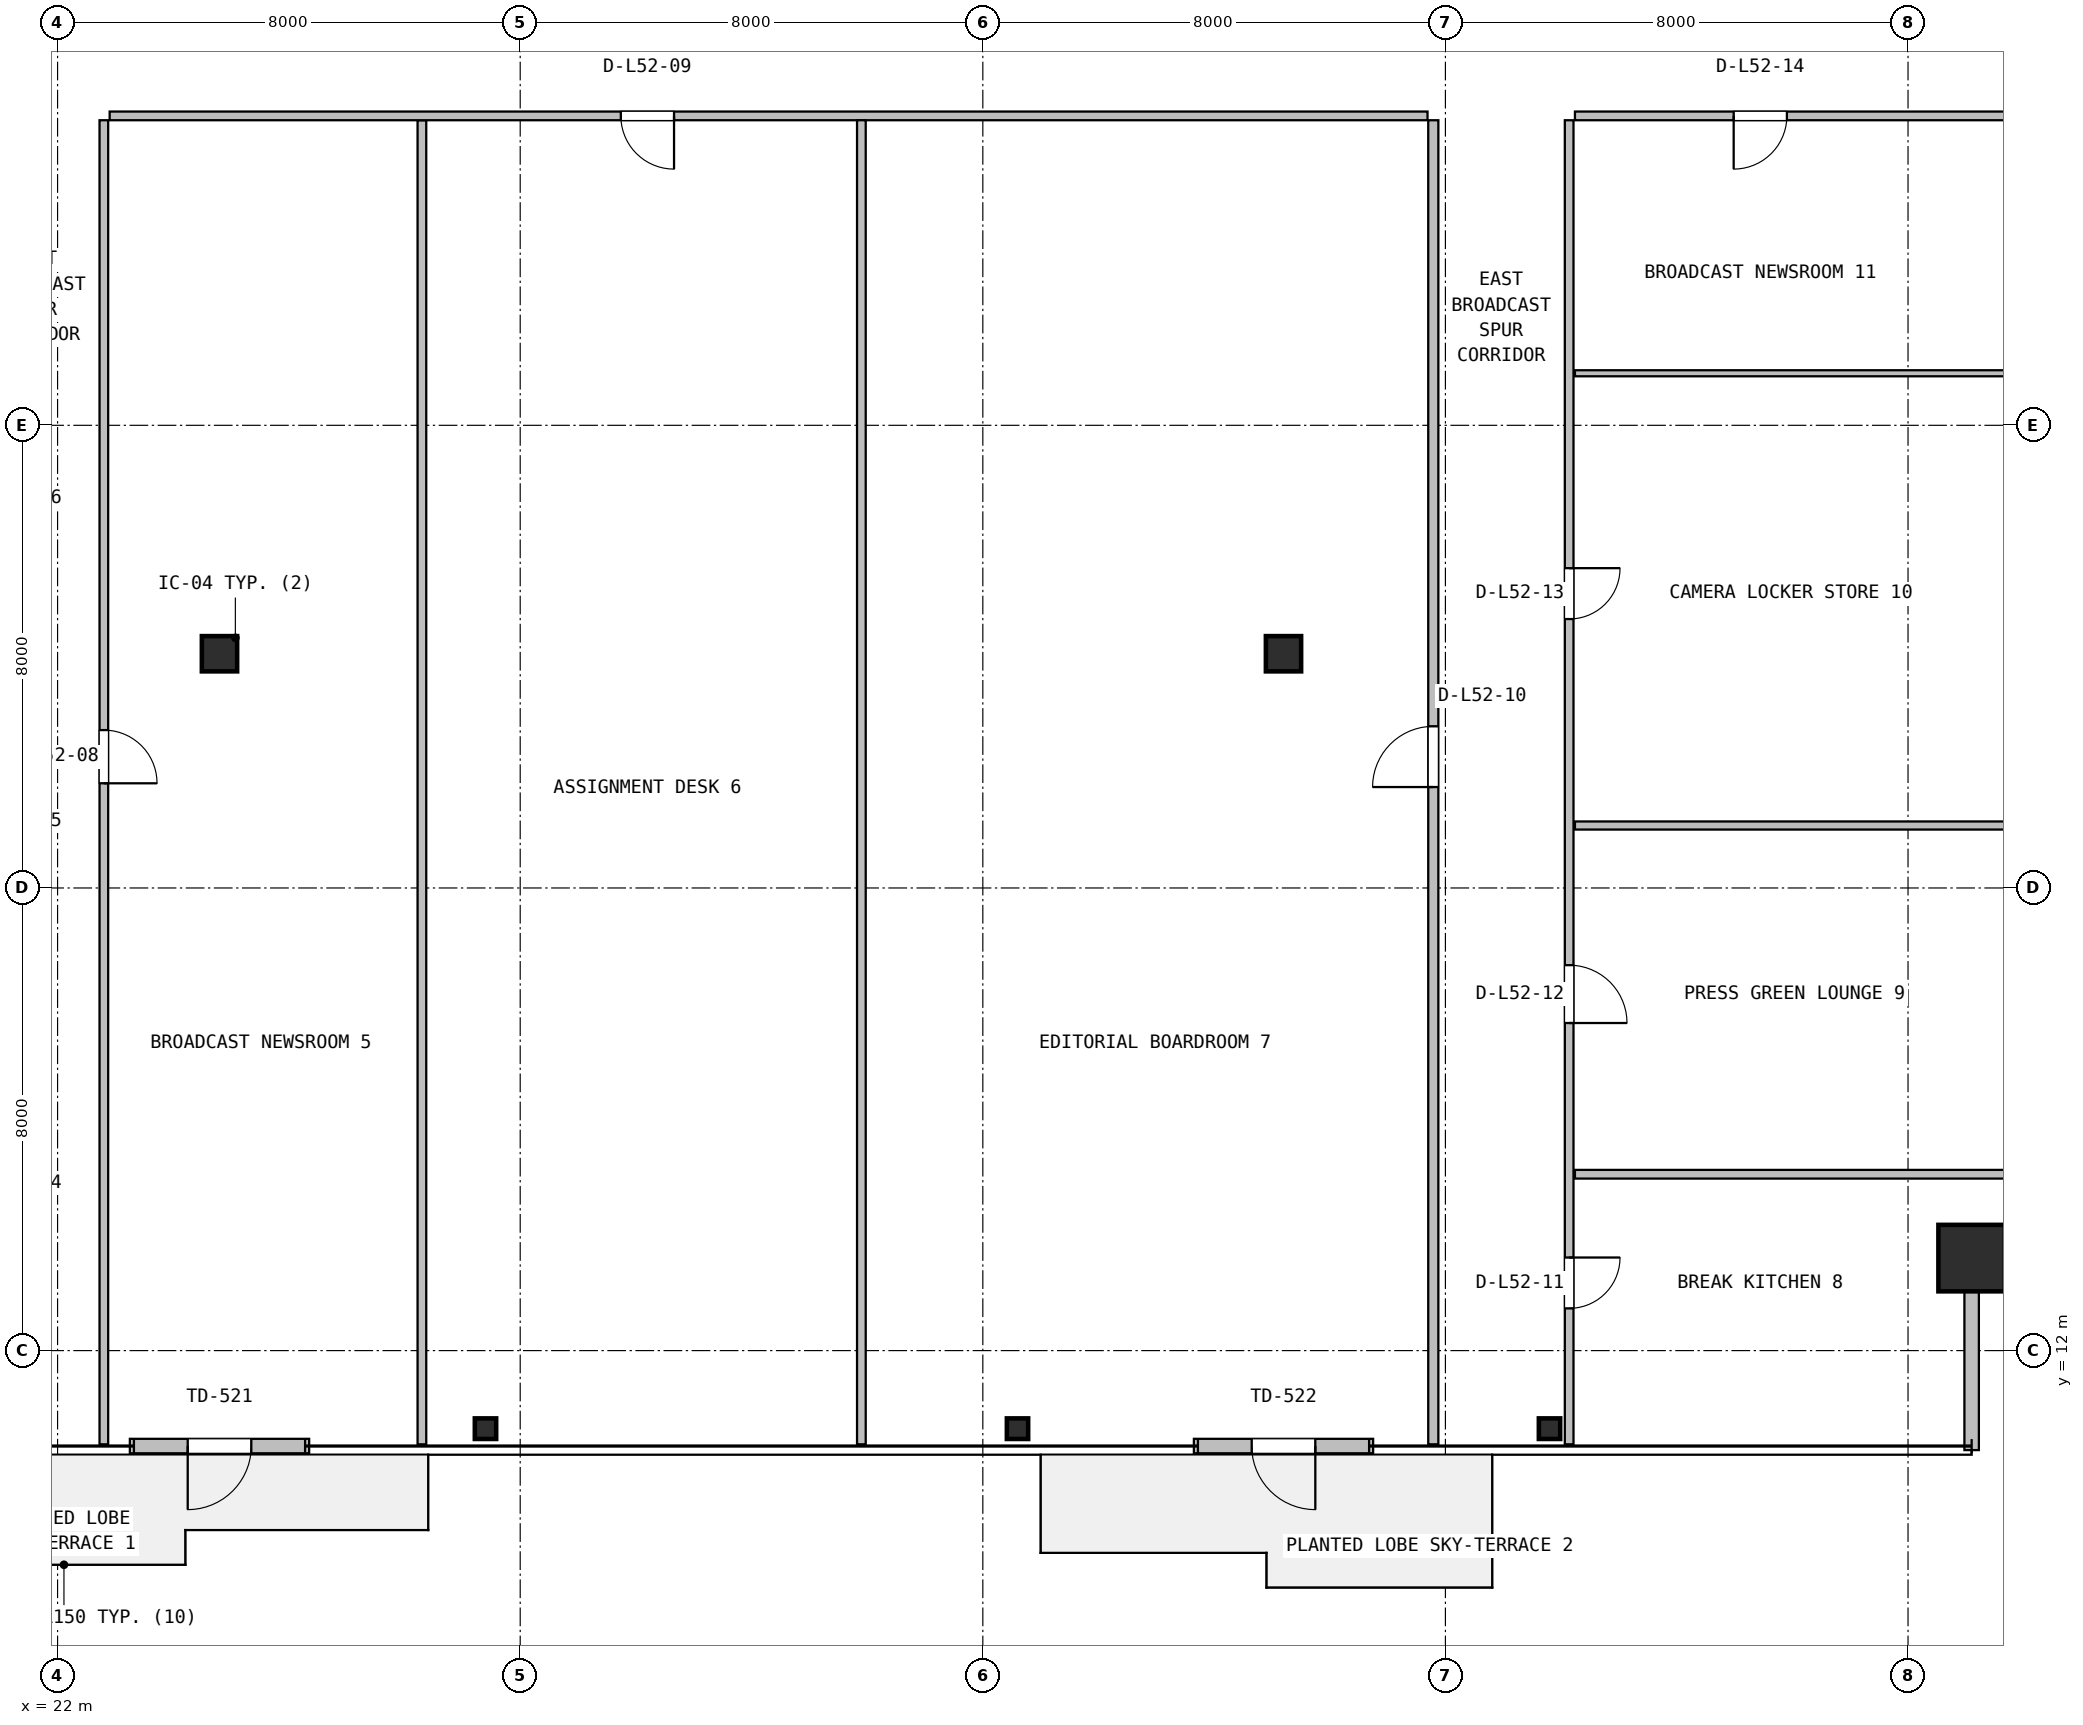
"""IFC4 building model, lengths in metres.
Left out: names, types, materials, properties, quantities, classifications, styles, units other than length and angle.
Written with IfcOpenShell. Run it as: python <this file> out.ifc"""

import sys

from ifc_helpers import new_model, si_unit, direction, frame, frame_2d, origin, origin_2d, place, context, subcontext, project, spatial, rectangle, hollow_rectangle, hollow_circle, i_section, extrude, source, transform, mapped, element, fill, save


model = new_model("IFC4")
c1 = context("Model", 3, precision=1e-05, world=origin(), true_north=direction((0.0, 1.0)))
c2 = subcontext(c1, "Body", "Model", "MODEL_VIEW")
j1 = project(units=[si_unit("LENGTHUNIT", "METRE"), si_unit("PLANEANGLEUNIT", "RADIAN")], contexts=[c1])
p1 = place(None, origin())
s1 = spatial("IfcSite", under=j1, at=p1, CompositionType="ELEMENT")
p2 = place(p1, origin())
s2 = spatial("IfcBuilding", under=s1, at=p2, CompositionType="ELEMENT")
p3 = place(p2, frame((0.0, 0.0, 211.2)))
s3 = spatial("IfcBuildingStorey", under=s2, at=p3, CompositionType="ELEMENT", Elevation=211.2)
m1 = source(origin(), c2, "Body", "SweptSolid", [
    extrude(hollow_rectangle(XDim=1.15, YDim=1.15, WallThickness=0.045, at=origin_2d()), origin(), (0.0, 0.0, 1.0), 3.8),
])
p4 = place(p3, frame((55.1, 13.6, 0.0), z_axis=(0.0, 0.0, 1.0), x_axis=(1.0, 0.0, 0.0)))
e1 = element("IfcColumn", 1, at=p4, inside=s3, PredefinedType="COLUMN", context=c2, shape_type="MappedRepresentation", body=[
    mapped(m1, transform((0.0, 0.0, 0.0), x_axis=(1.0, 0.0, 0.0), y_axis=(0.0, 1.0, 0.0), z_axis=(0.0, 0.0, 1.0), scale=1.0)),
])
m2 = source(origin(), c2, "Body", "SweptSolid", [
    extrude(i_section(OverallWidth=0.369, OverallDepth=0.356, WebThickness=0.011, FlangeThickness=0.018, FilletRadius=0.016, at=origin_2d()), origin(), (0.0, 0.0, 1.0), 3.8),
])
for number, where, z_axis, x_axis in (
    (2, (29.4, 10.65, 0.0), (0.0, 0.0, 1.0), (1.0, 0.0, 0.0)),
    (3, (38.6, 10.65, 0.0), (0.0, 0.0, 1.0), (1.0, 0.0, 0.0)),
    (4, (47.8, 10.65, 0.0), (0.0, 0.0, 1.0), (1.0, 0.0, 0.0)),
):
    element("IfcColumn", number, at=place(p3, frame(where, z_axis=z_axis, x_axis=x_axis)), inside=s3, PredefinedType="COLUMN", context=c2, shape_type="MappedRepresentation", body=[
        mapped(m2, transform((0.0, 0.0, 0.0), x_axis=(1.0, 0.0, 0.0), y_axis=(0.0, 1.0, 0.0), z_axis=(0.0, 0.0, 1.0), scale=1.0)),
    ])
m3 = source(origin(), c2, "Body", "SweptSolid", [
    extrude(hollow_circle(Radius=0.305, WallThickness=0.025, at=origin_2d()), origin(), (0.0, 0.0, 1.0), 3.8),
])
for number, where, z_axis, x_axis in (
    (5, (24.8, 24.05, 0.0), (0.0, 0.0, 1.0), (1.0, 0.0, 0.0)),
    (6, (43.2, 24.05, 0.0), (0.0, 0.0, 1.0), (1.0, 0.0, 0.0)),
):
    element("IfcColumn", number, at=place(p3, frame(where, z_axis=z_axis, x_axis=x_axis)), inside=s3, PredefinedType="COLUMN", context=c2, shape_type="MappedRepresentation", body=[
        mapped(m3, transform((0.0, 0.0, 0.0), x_axis=(1.0, 0.0, 0.0), y_axis=(0.0, 1.0, 0.0), z_axis=(0.0, 0.0, 1.0), scale=1.0)),
    ])
p5 = place(p3, frame((23.25, 10.35, 0.0), z_axis=(0.0, 0.0, 1.0), x_axis=(1.0, 0.0, 0.0)))
e7 = element("IfcWall", 7, at=p5, inside=s3, PredefinedType="SOLIDWALL", context=c2, shape_type="SweptSolid", body=[
    extrude(rectangle(XDim=3.1, YDim=0.25, at=frame_2d((1.55, 0.0))), origin(), (0.0, 0.0, 1.0), 3.53),
])
p6 = place(p5, frame((1.0, 0.0, 0.0)))
e8 = element("IfcOpeningElement", 8, at=p6, cuts=e7, PredefinedType="OPENING", context=c2, shape_type="SweptSolid", body=[
    extrude(rectangle(XDim=1.1, YDim=2.15, at=frame_2d((0.55, 1.075))), frame((0.0, 0.135, 0.0), z_axis=(0.0, -1.0, 0.0), x_axis=(1.0, 0.0, 0.0)), (0.0, 0.0, 1.0), 0.27),
])
p7 = place(p3, frame((41.65, 10.35, 0.0), z_axis=(0.0, 0.0, 1.0), x_axis=(1.0, 0.0, 0.0)))
e9 = element("IfcWall", 9, at=p7, inside=s3, PredefinedType="SOLIDWALL", context=c2, shape_type="SweptSolid", body=[
    extrude(rectangle(XDim=3.1, YDim=0.25, at=frame_2d((1.55, 0.0))), origin(), (0.0, 0.0, 1.0), 3.53),
])
p8 = place(p7, frame((1.0, 0.0, 0.0)))
e10 = element("IfcOpeningElement", 10, at=p8, cuts=e9, PredefinedType="OPENING", context=c2, shape_type="SweptSolid", body=[
    extrude(rectangle(XDim=1.1, YDim=2.15, at=frame_2d((0.55, 1.075))), frame((0.0, 0.135, 0.0), z_axis=(0.0, -1.0, 0.0), x_axis=(1.0, 0.0, 0.0)), (0.0, 0.0, 1.0), 0.27),
])
p9 = place(p3, frame((55.1, 10.28, 0.0), z_axis=(0.0, 0.0, 1.0), x_axis=(0.0, 1.0, 0.0)))
e11 = element("IfcWall", 11, at=p9, inside=s3, PredefinedType="SOLIDWALL", context=c2, shape_type="SweptSolid", body=[
    extrude(rectangle(XDim=3.4, YDim=0.25, at=frame_2d((1.7, 0.0))), origin(), (0.0, 0.0, 1.0), 3.171),
])
p10 = place(p3, frame((28.3, 10.38, 0.0), z_axis=(0.0, 0.0, 1.0), x_axis=(0.0, 1.0, 0.0)))
e12 = element("IfcWall", 12, at=p10, inside=s3, PredefinedType="PARTITIONING", context=c2, shape_type="SweptSolid", body=[
    extrude(rectangle(XDim=22.895, YDim=0.15, at=frame_2d((11.448, 0.0))), origin(), (0.0, 0.0, 1.0), 2.908),
])
p11 = place(p3, frame((22.9, 33.35, 0.0), z_axis=(0.0, 0.0, 1.0), x_axis=(1.0, 0.0, 0.0)))
e13 = element("IfcWall", 13, at=p11, inside=s3, PredefinedType="PARTITIONING", context=c2, shape_type="SweptSolid", body=[
    extrude(rectangle(XDim=22.79, YDim=0.15, at=frame_2d((11.395, 0.0))), origin(), (0.0, 0.0, 1.0), 2.908),
])
p12 = place(p11, frame((8.84, 0.0, 0.0)))
e14 = element("IfcOpeningElement", 14, at=p12, cuts=e13, PredefinedType="OPENING", context=c2, shape_type="SweptSolid", body=[
    extrude(rectangle(XDim=0.92, YDim=2.08, at=frame_2d((0.46, 1.04))), frame((0.0, 0.085, 0.0), z_axis=(0.0, -1.0, 0.0), x_axis=(1.0, 0.0, 0.0)), (0.0, 0.0, 1.0), 0.17),
])
p13 = place(p3, frame((22.8, 10.38, 0.0), z_axis=(0.0, 0.0, 1.0), x_axis=(0.0, 1.0, 0.0)))
e15 = element("IfcWall", 15, at=p13, inside=s3, PredefinedType="PARTITIONING", context=c2, shape_type="SweptSolid", body=[
    extrude(rectangle(XDim=22.895, YDim=0.15, at=frame_2d((11.448, 0.0))), origin(), (0.0, 0.0, 1.0), 3.171),
])
p14 = place(p13, frame((11.43, 0.0, 0.0)))
e16 = element("IfcOpeningElement", 16, at=p14, cuts=e15, PredefinedType="OPENING", context=c2, shape_type="SweptSolid", body=[
    extrude(rectangle(XDim=0.92, YDim=2.08, at=frame_2d((0.46, 1.04))), frame((0.0, 0.085, 0.0), z_axis=(0.0, -1.0, 0.0), x_axis=(1.0, 0.0, 0.0)), (0.0, 0.0, 1.0), 0.17),
])
p15 = place(p3, frame((35.9, 10.38, 0.0), z_axis=(0.0, 0.0, 1.0), x_axis=(0.0, 1.0, 0.0)))
e17 = element("IfcWall", 17, at=p15, inside=s3, PredefinedType="PARTITIONING", context=c2, shape_type="SweptSolid", body=[
    extrude(rectangle(XDim=22.895, YDim=0.15, at=frame_2d((11.448, 0.0))), origin(), (0.0, 0.0, 1.0), 2.908),
])
p16 = place(p3, frame((45.79, 10.38, 0.0), z_axis=(0.0, 0.0, 1.0), x_axis=(0.0, 1.0, 0.0)))
e18 = element("IfcWall", 18, at=p16, inside=s3, PredefinedType="PARTITIONING", context=c2, shape_type="SweptSolid", body=[
    extrude(rectangle(XDim=22.895, YDim=0.175, at=frame_2d((11.448, 0.0))), origin(), (0.0, 0.0, 1.0), 2.908),
])
p17 = place(p16, frame((11.365, 0.0, 0.0)))
e19 = element("IfcOpeningElement", 19, at=p17, cuts=e18, PredefinedType="OPENING", context=c2, shape_type="SweptSolid", body=[
    extrude(rectangle(XDim=1.05, YDim=2.1, at=frame_2d((0.525, 1.05))), frame((0.0, 0.098, 0.0), z_axis=(0.0, -1.0, 0.0), x_axis=(1.0, 0.0, 0.0)), (0.0, 0.0, 1.0), 0.195),
])
p18 = place(p3, frame((48.24, 15.05, 0.0), z_axis=(0.0, 0.0, 1.0), x_axis=(1.0, 0.0, 0.0)))
e20 = element("IfcWall", 20, at=p18, inside=s3, PredefinedType="PARTITIONING", context=c2, shape_type="SweptSolid", body=[
    extrude(rectangle(XDim=10.08, YDim=0.15, at=frame_2d((5.04, 0.0))), origin(), (0.0, 0.0, 1.0), 3.171),
])
p19 = place(p3, frame((48.14, 10.38, 0.0), z_axis=(0.0, 0.0, 1.0), x_axis=(0.0, 1.0, 0.0)))
e21 = element("IfcWall", 21, at=p19, inside=s3, PredefinedType="PARTITIONING", context=c2, shape_type="SweptSolid", body=[
    extrude(rectangle(XDim=22.895, YDim=0.15, at=frame_2d((11.448, 0.0))), origin(), (0.0, 0.0, 1.0), 3.171),
])
p20 = place(p19, frame((2.35, 0.0, 0.0)))
e22 = element("IfcOpeningElement", 22, at=p20, cuts=e21, PredefinedType="OPENING", context=c2, shape_type="SweptSolid", body=[
    extrude(rectangle(XDim=0.88, YDim=2.06, at=frame_2d((0.44, 1.03))), frame((0.0, 0.085, 0.0), z_axis=(0.0, -1.0, 0.0), x_axis=(1.0, 0.0, 0.0)), (0.0, 0.0, 1.0), 0.17),
])
p21 = place(p19, frame((7.285, 0.0, 0.0)))
e23 = element("IfcOpeningElement", 23, at=p21, cuts=e21, PredefinedType="OPENING", context=c2, shape_type="SweptSolid", body=[
    extrude(rectangle(XDim=1.0, YDim=2.1, at=frame_2d((0.5, 1.05))), frame((0.0, 0.085, 0.0), z_axis=(0.0, -1.0, 0.0), x_axis=(1.0, 0.0, 0.0)), (0.0, 0.0, 1.0), 0.17),
])
p22 = place(p19, frame((14.27, 0.0, 0.0)))
e24 = element("IfcOpeningElement", 24, at=p22, cuts=e21, PredefinedType="OPENING", context=c2, shape_type="SweptSolid", body=[
    extrude(rectangle(XDim=0.88, YDim=2.06, at=frame_2d((0.44, 1.03))), frame((0.0, 0.085, 0.0), z_axis=(0.0, -1.0, 0.0), x_axis=(1.0, 0.0, 0.0)), (0.0, 0.0, 1.0), 0.17),
])
p23 = place(p3, frame((48.24, 21.08, 0.0), z_axis=(0.0, 0.0, 1.0), x_axis=(1.0, 0.0, 0.0)))
e25 = element("IfcWall", 25, at=p23, inside=s3, PredefinedType="PARTITIONING", context=c2, shape_type="SweptSolid", body=[
    extrude(rectangle(XDim=10.08, YDim=0.14, at=frame_2d((5.04, 0.0))), origin(), (0.0, 0.0, 1.0), 3.171),
])
p24 = place(p3, frame((48.24, 28.9, 0.0), z_axis=(0.0, 0.0, 1.0), x_axis=(1.0, 0.0, 0.0)))
e26 = element("IfcWall", 26, at=p24, inside=s3, PredefinedType="PARTITIONING", context=c2, shape_type="SweptSolid", body=[
    extrude(rectangle(XDim=10.08, YDim=0.105, at=frame_2d((5.04, 0.0))), origin(), (0.0, 0.0, 1.0), 3.171),
])
p25 = place(p3, frame((48.24, 33.35, 0.0), z_axis=(0.0, 0.0, 1.0), x_axis=(1.0, 0.0, 0.0)))
e27 = element("IfcWall", 27, at=p25, inside=s3, PredefinedType="PARTITIONING", context=c2, shape_type="SweptSolid", body=[
    extrude(rectangle(XDim=10.08, YDim=0.15, at=frame_2d((5.04, 0.0))), origin(), (0.0, 0.0, 1.0), 3.171),
])
p26 = place(p25, frame((2.745, 0.0, 0.0)))
e28 = element("IfcOpeningElement", 28, at=p26, cuts=e27, PredefinedType="OPENING", context=c2, shape_type="SweptSolid", body=[
    extrude(rectangle(XDim=0.92, YDim=2.08, at=frame_2d((0.46, 1.04))), frame((0.0, 0.085, 0.0), z_axis=(0.0, -1.0, 0.0), x_axis=(1.0, 0.0, 0.0)), (0.0, 0.0, 1.0), 0.17),
])
m4 = source(origin(), c2, "Body", "SweptSolid", [
    extrude(rectangle(XDim=1.1, YDim=2.15, at=frame_2d((0.55, 1.075))), frame((0.0, 0.025, 0.0), z_axis=(0.0, -1.0, 0.0), x_axis=(1.0, 0.0, 0.0)), (0.0, 0.0, 1.0), 0.05),
])
p27 = place(p6, frame((1.1, 0.0, 0.0), z_axis=(0.0, 0.0, 1.0), x_axis=(-1.0, 0.0, 0.0)))
e29 = element("IfcDoor", 29, at=p27, inside=s3, OperationType="SINGLE_SWING_LEFT", PredefinedType="DOOR", context=c2, shape_type="MappedRepresentation", body=[
    mapped(m4, transform((0.0, 0.0, 0.0), x_axis=(1.0, 0.0, 0.0), y_axis=(0.0, 1.0, 0.0), z_axis=(0.0, 0.0, 1.0), scale=1.0)),
])
fill(e8, e29)
p28 = place(p8, frame((1.1, 0.0, 0.0), z_axis=(0.0, 0.0, 1.0), x_axis=(-1.0, 0.0, 0.0)))
e30 = element("IfcDoor", 30, at=p28, inside=s3, OperationType="SINGLE_SWING_RIGHT", PredefinedType="DOOR", context=c2, shape_type="MappedRepresentation", body=[
    mapped(m4, transform((0.0, 0.0, 0.0), x_axis=(1.0, 0.0, 0.0), y_axis=(0.0, 1.0, 0.0), z_axis=(0.0, 0.0, 1.0), scale=1.0)),
])
fill(e10, e30)
m5 = source(origin(), c2, "Body", "SweptSolid", [
    extrude(rectangle(XDim=0.92, YDim=2.08, at=frame_2d((0.46, 1.04))), frame((0.0, 0.025, 0.0), z_axis=(0.0, -1.0, 0.0), x_axis=(1.0, 0.0, 0.0)), (0.0, 0.0, 1.0), 0.05),
])
p29 = place(p14, frame((0.92, 0.0, 0.0), z_axis=(0.0, 0.0, 1.0), x_axis=(-1.0, 0.0, 0.0)))
e31 = element("IfcDoor", 31, at=p29, inside=s3, OperationType="SINGLE_SWING_LEFT", PredefinedType="DOOR", context=c2, shape_type="MappedRepresentation", body=[
    mapped(m5, transform((0.0, 0.0, 0.0), x_axis=(1.0, 0.0, 0.0), y_axis=(0.0, 1.0, 0.0), z_axis=(0.0, 0.0, 1.0), scale=1.0)),
])
fill(e16, e31)
p30 = place(p12, frame((0.92, 0.0, 0.0), z_axis=(0.0, 0.0, 1.0), x_axis=(-1.0, 0.0, 0.0)))
e32 = element("IfcDoor", 32, at=p30, inside=s3, OperationType="SINGLE_SWING_RIGHT", PredefinedType="DOOR", context=c2, shape_type="MappedRepresentation", body=[
    mapped(m5, transform((0.0, 0.0, 0.0), x_axis=(1.0, 0.0, 0.0), y_axis=(0.0, 1.0, 0.0), z_axis=(0.0, 0.0, 1.0), scale=1.0)),
])
fill(e14, e32)
m6 = source(origin(), c2, "Body", "SweptSolid", [
    extrude(rectangle(XDim=1.05, YDim=2.1, at=frame_2d((0.525, 1.05))), frame((0.0, 0.025, 0.0), z_axis=(0.0, -1.0, 0.0), x_axis=(1.0, 0.0, 0.0)), (0.0, 0.0, 1.0), 0.05),
])
p31 = place(p17, origin())
e33 = element("IfcDoor", 33, at=p31, inside=s3, OperationType="SINGLE_SWING_LEFT", PredefinedType="DOOR", context=c2, shape_type="MappedRepresentation", body=[
    mapped(m6, transform((0.0, 0.0, 0.0), x_axis=(1.0, 0.0, 0.0), y_axis=(0.0, 1.0, 0.0), z_axis=(0.0, 0.0, 1.0), scale=1.0)),
])
fill(e19, e33)
m7 = source(origin(), c2, "Body", "SweptSolid", [
    extrude(rectangle(XDim=0.88, YDim=2.06, at=frame_2d((0.44, 1.03))), frame((0.0, 0.025, 0.0), z_axis=(0.0, -1.0, 0.0), x_axis=(1.0, 0.0, 0.0)), (0.0, 0.0, 1.0), 0.05),
])
p32 = place(p20, frame((0.88, 0.0, 0.0), z_axis=(0.0, 0.0, 1.0), x_axis=(-1.0, 0.0, 0.0)))
e34 = element("IfcDoor", 34, at=p32, inside=s3, OperationType="SINGLE_SWING_RIGHT", PredefinedType="DOOR", context=c2, shape_type="MappedRepresentation", body=[
    mapped(m7, transform((0.0, 0.0, 0.0), x_axis=(1.0, 0.0, 0.0), y_axis=(0.0, 1.0, 0.0), z_axis=(0.0, 0.0, 1.0), scale=1.0)),
])
fill(e22, e34)
m8 = source(origin(), c2, "Body", "SweptSolid", [
    extrude(rectangle(XDim=1.0, YDim=2.1, at=frame_2d((0.5, 1.05))), frame((0.0, 0.025, 0.0), z_axis=(0.0, -1.0, 0.0), x_axis=(1.0, 0.0, 0.0)), (0.0, 0.0, 1.0), 0.05),
])
p33 = place(p21, frame((1.0, 0.0, 0.0), z_axis=(0.0, 0.0, 1.0), x_axis=(-1.0, 0.0, 0.0)))
e35 = element("IfcDoor", 35, at=p33, inside=s3, OperationType="SINGLE_SWING_LEFT", PredefinedType="DOOR", context=c2, shape_type="MappedRepresentation", body=[
    mapped(m8, transform((0.0, 0.0, 0.0), x_axis=(1.0, 0.0, 0.0), y_axis=(0.0, 1.0, 0.0), z_axis=(0.0, 0.0, 1.0), scale=1.0)),
])
fill(e23, e35)
p34 = place(p22, frame((0.88, 0.0, 0.0), z_axis=(0.0, 0.0, 1.0), x_axis=(-1.0, 0.0, 0.0)))
e36 = element("IfcDoor", 36, at=p34, inside=s3, OperationType="SINGLE_SWING_RIGHT", PredefinedType="DOOR", context=c2, shape_type="MappedRepresentation", body=[
    mapped(m7, transform((0.0, 0.0, 0.0), x_axis=(1.0, 0.0, 0.0), y_axis=(0.0, 1.0, 0.0), z_axis=(0.0, 0.0, 1.0), scale=1.0)),
])
fill(e24, e36)
p35 = place(p26, frame((0.92, 0.0, 0.0), z_axis=(0.0, 0.0, 1.0), x_axis=(-1.0, 0.0, 0.0)))
e37 = element("IfcDoor", 37, at=p35, inside=s3, OperationType="SINGLE_SWING_LEFT", PredefinedType="DOOR", context=c2, shape_type="MappedRepresentation", body=[
    mapped(m5, transform((0.0, 0.0, 0.0), x_axis=(1.0, 0.0, 0.0), y_axis=(0.0, 1.0, 0.0), z_axis=(0.0, 0.0, 1.0), scale=1.0)),
])
fill(e28, e37)
save(model, sys.argv[1])
